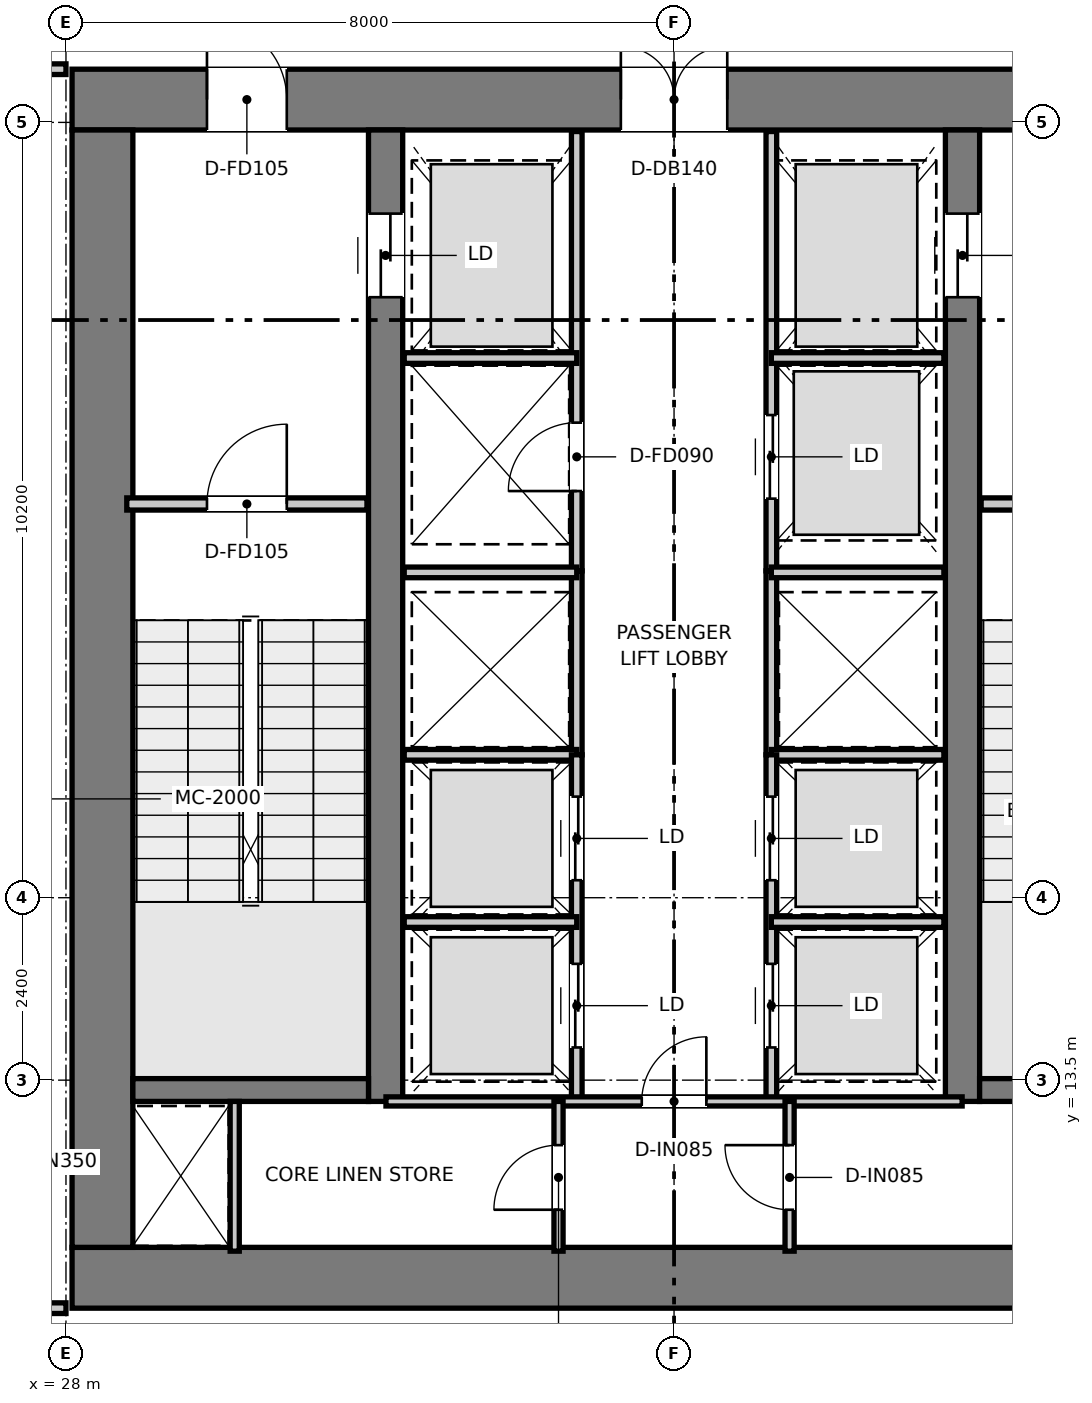
"""IFC4 building model, lengths in metres.
Left out: names, types, materials, properties, quantities, classifications, styles, units other than length and angle.
Written with IfcOpenShell. Run it as: python <this file> out.ifc"""

import sys

from ifc_helpers import new_model, si_unit, direction, frame, frame_2d, origin, place, context, subcontext, project, spatial, rectangle, extrude, element, fill, save


model = new_model("IFC4")
c1 = context("Model", 3, precision=1e-05, world=origin(), true_north=direction((0.0, 1.0)))
c2 = subcontext(c1, "Body", "Model", "MODEL_VIEW")
j1 = project(units=[si_unit("LENGTHUNIT", "METRE"), si_unit("PLANEANGLEUNIT", "RADIAN")], contexts=[c1])
p1 = place(None, origin())
s1 = spatial("IfcSite", under=j1, at=p1, CompositionType="ELEMENT")
p2 = place(p1, origin())
s2 = spatial("IfcBuilding", under=s1, at=p2, CompositionType="ELEMENT")
p3 = place(p2, frame((0.0, 0.0, 141.4)))
s3 = spatial("IfcBuildingStorey", under=s2, at=p3, CompositionType="ELEMENT", Elevation=141.4)
p4 = place(p3, frame((28.08, 10.9, 0.0), z_axis=(0.0, 0.0, 1.0), x_axis=(1.0, 0.0, 0.0)))
e1 = element("IfcWall", 1, at=p4, inside=s3, PredefinedType="SHEAR", context=c2, shape_type="SweptSolid", body=[
    extrude(rectangle(XDim=15.84, YDim=0.8, at=frame_2d((7.92, 0.0))), origin(), (0.0, 0.0, 1.0), 4.8),
])
p5 = place(p3, frame((28.08, 26.4, 0.0), z_axis=(0.0, 0.0, 1.0), x_axis=(1.0, 0.0, 0.0)))
e2 = element("IfcWall", 2, at=p5, inside=s3, PredefinedType="SHEAR", context=c2, shape_type="SweptSolid", body=[
    extrude(rectangle(XDim=15.84, YDim=0.8, at=frame_2d((7.92, 0.0))), origin(), (0.0, 0.0, 1.0), 4.8),
])
p6 = place(p5, frame((7.22, 0.0, 0.0)))
e3 = element("IfcOpeningElement", 3, at=p6, cuts=e2, PredefinedType="OPENING", context=c2, shape_type="SweptSolid", body=[
    extrude(rectangle(XDim=1.4, YDim=2.2, at=frame_2d((0.7, 1.1))), frame((0.0, 0.41, 0.0), z_axis=(0.0, -1.0, 0.0), x_axis=(1.0, 0.0, 0.0)), (0.0, 0.0, 1.0), 0.82),
])
p7 = place(p5, frame((1.775, 0.0, 0.0)))
e4 = element("IfcOpeningElement", 4, at=p7, cuts=e2, PredefinedType="OPENING", context=c2, shape_type="SweptSolid", body=[
    extrude(rectangle(XDim=1.05, YDim=2.1, at=frame_2d((0.525, 1.05))), frame((0.0, 0.41, 0.0), z_axis=(0.0, -1.0, 0.0), x_axis=(1.0, 0.0, 0.0)), (0.0, 0.0, 1.0), 0.82),
])
p8 = place(p5, frame((13.015, 0.0, 0.0)))
e5 = element("IfcOpeningElement", 5, at=p8, cuts=e2, PredefinedType="OPENING", context=c2, shape_type="SweptSolid", body=[
    extrude(rectangle(XDim=1.05, YDim=2.1, at=frame_2d((0.525, 1.05))), frame((0.0, 0.41, 0.0), z_axis=(0.0, -1.0, 0.0), x_axis=(1.0, 0.0, 0.0)), (0.0, 0.0, 1.0), 0.82),
])
p9 = place(p3, frame((28.48, 11.3, 0.0), z_axis=(0.0, 0.0, 1.0), x_axis=(0.0, 1.0, 0.0)))
e6 = element("IfcWall", 6, at=p9, inside=s3, PredefinedType="SHEAR", context=c2, shape_type="SweptSolid", body=[
    extrude(rectangle(XDim=14.7, YDim=0.8, at=frame_2d((7.35, 0.0))), origin(), (0.0, 0.0, 1.0), 4.8),
])
p10 = place(p3, frame((32.205, 13.22, 0.0), z_axis=(0.0, 0.0, 1.0), x_axis=(0.0, 1.0, 0.0)))
e7 = element("IfcWall", 7, at=p10, inside=s3, PredefinedType="SHEAR", context=c2, shape_type="SweptSolid", body=[
    extrude(rectangle(XDim=12.78, YDim=0.45, at=frame_2d((6.39, 0.0))), origin(), (0.0, 0.0, 1.0), 4.8),
])
p11 = place(p10, frame((10.58, 0.0, 0.0)))
e8 = element("IfcOpeningElement", 8, at=p11, cuts=e7, PredefinedType="OPENING", context=c2, shape_type="SweptSolid", body=[
    extrude(rectangle(XDim=1.1, YDim=2.15, at=frame_2d((0.55, 1.075))), frame((0.0, 0.235, 0.0), z_axis=(0.0, -1.0, 0.0), x_axis=(1.0, 0.0, 0.0)), (0.0, 0.0, 1.0), 0.47),
])
p12 = place(p3, frame((39.795, 13.22, 0.0), z_axis=(0.0, 0.0, 1.0), x_axis=(0.0, 1.0, 0.0)))
e9 = element("IfcWall", 9, at=p12, inside=s3, PredefinedType="SHEAR", context=c2, shape_type="SweptSolid", body=[
    extrude(rectangle(XDim=12.78, YDim=0.45, at=frame_2d((6.39, 0.0))), origin(), (0.0, 0.0, 1.0), 4.8),
])
p13 = place(p12, frame((10.58, 0.0, 0.0)))
e10 = element("IfcOpeningElement", 10, at=p13, cuts=e9, PredefinedType="OPENING", context=c2, shape_type="SweptSolid", body=[
    extrude(rectangle(XDim=1.1, YDim=2.15, at=frame_2d((0.55, 1.075))), frame((0.0, 0.235, 0.0), z_axis=(0.0, -1.0, 0.0), x_axis=(1.0, 0.0, 0.0)), (0.0, 0.0, 1.0), 0.47),
])
for number, where, z_axis, x_axis in (
    (11, (28.88, 13.37, 0.0), (0.0, 0.0, 1.0), (1.0, 0.0, 0.0)),
    (12, (40.02, 13.37, 0.0), (0.0, 0.0, 1.0), (1.0, 0.0, 0.0)),
):
    element("IfcWall", number, at=place(p3, frame(where, z_axis=z_axis, x_axis=x_axis)), inside=s3, PredefinedType="SHEAR", context=c2, shape_type="SweptSolid", body=[
        extrude(rectangle(XDim=3.1, YDim=0.3, at=frame_2d((1.55, 0.0))), origin(), (0.0, 0.0, 1.0), 4.8),
    ])
p14 = place(p3, frame((28.8, 21.08, 0.0), z_axis=(0.0, 0.0, 1.0), x_axis=(1.0, 0.0, 0.0)))
e13 = element("IfcWall", 13, at=p14, inside=s3, PredefinedType="PARTITIONING", context=c2, shape_type="SweptSolid", body=[
    extrude(rectangle(XDim=3.16, YDim=0.16, at=frame_2d((1.58, 0.0))), origin(), (0.0, 0.0, 1.0), 4.52),
])
p15 = place(p14, frame((1.055, 0.0, 0.0)))
e14 = element("IfcOpeningElement", 14, at=p15, cuts=e13, PredefinedType="OPENING", context=c2, shape_type="SweptSolid", body=[
    extrude(rectangle(XDim=1.05, YDim=2.1, at=frame_2d((0.525, 1.05))), frame((0.0, 0.09, 0.0), z_axis=(0.0, -1.0, 0.0), x_axis=(1.0, 0.0, 0.0)), (0.0, 0.0, 1.0), 0.18),
])
p16 = place(p3, frame((40.04, 21.08, 0.0), z_axis=(0.0, 0.0, 1.0), x_axis=(1.0, 0.0, 0.0)))
e15 = element("IfcWall", 15, at=p16, inside=s3, PredefinedType="PARTITIONING", context=c2, shape_type="SweptSolid", body=[
    extrude(rectangle(XDim=3.16, YDim=0.16, at=frame_2d((1.58, 0.0))), origin(), (0.0, 0.0, 1.0), 4.52),
])
p17 = place(p16, frame((1.055, 0.0, 0.0)))
e16 = element("IfcOpeningElement", 16, at=p17, cuts=e15, PredefinedType="OPENING", context=c2, shape_type="SweptSolid", body=[
    extrude(rectangle(XDim=1.05, YDim=2.1, at=frame_2d((0.525, 1.05))), frame((0.0, 0.09, 0.0), z_axis=(0.0, -1.0, 0.0), x_axis=(1.0, 0.0, 0.0)), (0.0, 0.0, 1.0), 0.18),
])
p18 = place(p3, frame((34.72, 20.2, 0.0), z_axis=(0.0, 0.0, 1.0), x_axis=(0.0, 1.0, 0.0)))
e17 = element("IfcWall", 17, at=p18, inside=s3, PredefinedType="PARTITIONING", context=c2, shape_type="SweptSolid", body=[
    extrude(rectangle(XDim=5.78, YDim=0.14, at=frame_2d((2.89, 0.0))), origin(), (0.0, 0.0, 1.0), 3.52),
])
p19 = place(p18, frame((1.05, 0.0, 0.0)))
e18 = element("IfcOpeningElement", 18, at=p19, cuts=e17, PredefinedType="OPENING", context=c2, shape_type="SweptSolid", body=[
    extrude(rectangle(XDim=0.9, YDim=2.1, at=frame_2d((0.45, 1.05))), frame((0.0, 0.08, 0.0), z_axis=(0.0, -1.0, 0.0), x_axis=(1.0, 0.0, 0.0)), (0.0, 0.0, 1.0), 0.16),
])
p20 = place(p3, frame((37.28, 20.2, 0.0), z_axis=(0.0, 0.0, 1.0), x_axis=(0.0, 1.0, 0.0)))
e19 = element("IfcWall", 19, at=p20, inside=s3, PredefinedType="PARTITIONING", context=c2, shape_type="SweptSolid", body=[
    extrude(rectangle(XDim=5.78, YDim=0.14, at=frame_2d((2.89, 0.0))), origin(), (0.0, 0.0, 1.0), 3.52),
])
p21 = place(p20, frame((0.95, 0.0, 0.0)))
e20 = element("IfcOpeningElement", 20, at=p21, cuts=e19, PredefinedType="OPENING", context=c2, shape_type="SweptSolid", body=[
    extrude(rectangle(XDim=1.1, YDim=2.15, at=frame_2d((0.55, 1.075))), frame((0.0, 0.08, 0.0), z_axis=(0.0, -1.0, 0.0), x_axis=(1.0, 0.0, 0.0)), (0.0, 0.0, 1.0), 0.16),
])
for number, where, z_axis, x_axis in (
    (21, (32.45, 23.0, 0.0), (0.0, 0.0, 1.0), (1.0, 0.0, 0.0)),
    (22, (37.28, 23.0, 0.0), (0.0, 0.0, 1.0), (1.0, 0.0, 0.0)),
):
    element("IfcWall", number, at=place(p3, frame(where, z_axis=z_axis, x_axis=x_axis)), inside=s3, PredefinedType="PARTITIONING", context=c2, shape_type="SweptSolid", body=[
        extrude(rectangle(XDim=2.27, YDim=0.14, at=frame_2d((1.135, 0.0))), origin(), (0.0, 0.0, 1.0), 3.52),
    ])
for number, where, z_axis, x_axis in (
    (23, (34.72, 17.78, 0.0), (0.0, 0.0, 1.0), (0.0, 1.0, 0.0)),
    (24, (37.28, 17.78, 0.0), (0.0, 0.0, 1.0), (0.0, 1.0, 0.0)),
):
    element("IfcWall", number, at=place(p3, frame(where, z_axis=z_axis, x_axis=x_axis)), inside=s3, PredefinedType="PARTITIONING", context=c2, shape_type="SweptSolid", body=[
        extrude(rectangle(XDim=2.42, YDim=0.14, at=frame_2d((1.21, 0.0))), origin(), (0.0, 0.0, 1.0), 4.52),
    ])
for number, where, z_axis, x_axis in (
    (25, (32.45, 17.78, 0.0), (0.0, 0.0, 1.0), (1.0, 0.0, 0.0)),
    (26, (32.45, 20.18, 0.0), (0.0, 0.0, 1.0), (1.0, 0.0, 0.0)),
    (27, (37.28, 17.78, 0.0), (0.0, 0.0, 1.0), (1.0, 0.0, 0.0)),
    (28, (37.28, 20.18, 0.0), (0.0, 0.0, 1.0), (1.0, 0.0, 0.0)),
):
    element("IfcWall", number, at=place(p3, frame(where, z_axis=z_axis, x_axis=x_axis)), inside=s3, PredefinedType="PARTITIONING", context=c2, shape_type="SweptSolid", body=[
        extrude(rectangle(XDim=2.27, YDim=0.14, at=frame_2d((1.135, 0.0))), origin(), (0.0, 0.0, 1.0), 4.52),
    ])
p22 = place(p3, frame((34.72, 13.22, 0.0), z_axis=(0.0, 0.0, 1.0), x_axis=(0.0, 1.0, 0.0)))
e29 = element("IfcWall", 29, at=p22, inside=s3, PredefinedType="PARTITIONING", context=c2, shape_type="SweptSolid", body=[
    extrude(rectangle(XDim=4.56, YDim=0.14, at=frame_2d((2.28, 0.0))), origin(), (0.0, 0.0, 1.0), 4.52),
])
p23 = place(p22, frame((0.71, 0.0, 0.0)))
e30 = element("IfcOpeningElement", 30, at=p23, cuts=e29, PredefinedType="OPENING", context=c2, shape_type="SweptSolid", body=[
    extrude(rectangle(XDim=1.1, YDim=2.15, at=frame_2d((0.55, 1.075))), frame((0.0, 0.08, 0.0), z_axis=(0.0, -1.0, 0.0), x_axis=(1.0, 0.0, 0.0)), (0.0, 0.0, 1.0), 0.16),
])
p24 = place(p22, frame((2.91, 0.0, 0.0)))
e31 = element("IfcOpeningElement", 31, at=p24, cuts=e29, PredefinedType="OPENING", context=c2, shape_type="SweptSolid", body=[
    extrude(rectangle(XDim=1.1, YDim=2.15, at=frame_2d((0.55, 1.075))), frame((0.0, 0.08, 0.0), z_axis=(0.0, -1.0, 0.0), x_axis=(1.0, 0.0, 0.0)), (0.0, 0.0, 1.0), 0.16),
])
p25 = place(p3, frame((32.45, 15.58, 0.0), z_axis=(0.0, 0.0, 1.0), x_axis=(1.0, 0.0, 0.0)))
e32 = element("IfcWall", 32, at=p25, inside=s3, PredefinedType="PARTITIONING", context=c2, shape_type="SweptSolid", body=[
    extrude(rectangle(XDim=2.27, YDim=0.14, at=frame_2d((1.135, 0.0))), origin(), (0.0, 0.0, 1.0), 4.52),
])
p26 = place(p3, frame((37.28, 13.22, 0.0), z_axis=(0.0, 0.0, 1.0), x_axis=(0.0, 1.0, 0.0)))
e33 = element("IfcWall", 33, at=p26, inside=s3, PredefinedType="PARTITIONING", context=c2, shape_type="SweptSolid", body=[
    extrude(rectangle(XDim=4.56, YDim=0.14, at=frame_2d((2.28, 0.0))), origin(), (0.0, 0.0, 1.0), 4.52),
])
p27 = place(p26, frame((0.71, 0.0, 0.0)))
e34 = element("IfcOpeningElement", 34, at=p27, cuts=e33, PredefinedType="OPENING", context=c2, shape_type="SweptSolid", body=[
    extrude(rectangle(XDim=1.1, YDim=2.15, at=frame_2d((0.55, 1.075))), frame((0.0, 0.08, 0.0), z_axis=(0.0, -1.0, 0.0), x_axis=(1.0, 0.0, 0.0)), (0.0, 0.0, 1.0), 0.16),
])
p28 = place(p26, frame((2.91, 0.0, 0.0)))
e35 = element("IfcOpeningElement", 35, at=p28, cuts=e33, PredefinedType="OPENING", context=c2, shape_type="SweptSolid", body=[
    extrude(rectangle(XDim=1.1, YDim=2.15, at=frame_2d((0.55, 1.075))), frame((0.0, 0.08, 0.0), z_axis=(0.0, -1.0, 0.0), x_axis=(1.0, 0.0, 0.0)), (0.0, 0.0, 1.0), 0.16),
])
p29 = place(p3, frame((37.28, 15.58, 0.0), z_axis=(0.0, 0.0, 1.0), x_axis=(1.0, 0.0, 0.0)))
e36 = element("IfcWall", 36, at=p29, inside=s3, PredefinedType="PARTITIONING", context=c2, shape_type="SweptSolid", body=[
    extrude(rectangle(XDim=2.27, YDim=0.14, at=frame_2d((1.135, 0.0))), origin(), (0.0, 0.0, 1.0), 4.52),
])
p30 = place(p3, frame((30.22, 11.25, 0.0), z_axis=(0.0, 0.0, 1.0), x_axis=(0.0, 1.0, 0.0)))
e37 = element("IfcWall", 37, at=p30, inside=s3, PredefinedType="PARTITIONING", context=c2, shape_type="SweptSolid", body=[
    extrude(rectangle(XDim=1.97, YDim=0.12, at=frame_2d((0.985, 0.0))), origin(), (0.0, 0.0, 1.0), 4.52),
])
p31 = place(p3, frame((32.21, 13.22, 0.0), z_axis=(0.0, 0.0, 1.0), x_axis=(1.0, 0.0, 0.0)))
e38 = element("IfcWall", 38, at=p31, inside=s3, PredefinedType="PARTITIONING", context=c2, shape_type="SweptSolid", body=[
    extrude(rectangle(XDim=7.58, YDim=0.12, at=frame_2d((3.79, 0.0))), origin(), (0.0, 0.0, 1.0), 4.52),
])
p32 = place(p31, frame((3.365, 0.0, 0.0)))
e39 = element("IfcOpeningElement", 39, at=p32, cuts=e38, PredefinedType="OPENING", context=c2, shape_type="SweptSolid", body=[
    extrude(rectangle(XDim=0.85, YDim=2.1, at=frame_2d((0.425, 1.05))), frame((0.0, 0.07, 0.0), z_axis=(0.0, -1.0, 0.0), x_axis=(1.0, 0.0, 0.0)), (0.0, 0.0, 1.0), 0.14),
])
p33 = place(p3, frame((34.48, 11.25, 0.0), z_axis=(0.0, 0.0, 1.0), x_axis=(0.0, 1.0, 0.0)))
e40 = element("IfcWall", 40, at=p33, inside=s3, PredefinedType="PARTITIONING", context=c2, shape_type="SweptSolid", body=[
    extrude(rectangle(XDim=1.97, YDim=0.12, at=frame_2d((0.985, 0.0))), origin(), (0.0, 0.0, 1.0), 4.52),
])
p34 = place(p33, frame((0.545, 0.0, 0.0)))
e41 = element("IfcOpeningElement", 41, at=p34, cuts=e40, PredefinedType="OPENING", context=c2, shape_type="SweptSolid", body=[
    extrude(rectangle(XDim=0.85, YDim=2.1, at=frame_2d((0.425, 1.05))), frame((0.0, 0.07, 0.0), z_axis=(0.0, -1.0, 0.0), x_axis=(1.0, 0.0, 0.0)), (0.0, 0.0, 1.0), 0.14),
])
p35 = place(p3, frame((37.52, 11.25, 0.0), z_axis=(0.0, 0.0, 1.0), x_axis=(0.0, 1.0, 0.0)))
e42 = element("IfcWall", 42, at=p35, inside=s3, PredefinedType="PARTITIONING", context=c2, shape_type="SweptSolid", body=[
    extrude(rectangle(XDim=1.97, YDim=0.12, at=frame_2d((0.985, 0.0))), origin(), (0.0, 0.0, 1.0), 4.52),
])
p36 = place(p35, frame((0.545, 0.0, 0.0)))
e43 = element("IfcOpeningElement", 43, at=p36, cuts=e42, PredefinedType="OPENING", context=c2, shape_type="SweptSolid", body=[
    extrude(rectangle(XDim=0.85, YDim=2.1, at=frame_2d((0.425, 1.05))), frame((0.0, 0.07, 0.0), z_axis=(0.0, -1.0, 0.0), x_axis=(1.0, 0.0, 0.0)), (0.0, 0.0, 1.0), 0.14),
])
p37 = place(p3, frame((26.32, 26.8, 0.0), z_axis=(0.0, 0.0, 1.0), x_axis=(1.0, 0.0, 0.0)))
e44 = element("IfcWall", 44, at=p37, inside=s3, PredefinedType="PARTITIONING", context=c2, shape_type="SweptSolid", body=[
    extrude(rectangle(XDim=1.68, YDim=0.14, at=frame_2d((0.84, 0.0))), origin(), (0.0, 0.0, 1.0), 3.93),
])
p38 = place(p37, frame((0.445, 0.0, 0.0)))
e45 = element("IfcOpeningElement", 45, at=p38, cuts=e44, PredefinedType="OPENING", context=c2, shape_type="SweptSolid", body=[
    extrude(rectangle(XDim=0.85, YDim=2.1, at=frame_2d((0.425, 1.05))), frame((0.0, 0.08, 0.0), z_axis=(0.0, -1.0, 0.0), x_axis=(1.0, 0.0, 0.0)), (0.0, 0.0, 1.0), 0.16),
])
p39 = place(p3, frame((26.32, 10.5, 0.0), z_axis=(0.0, 0.0, 1.0), x_axis=(1.0, 0.0, 0.0)))
e46 = element("IfcWall", 46, at=p39, inside=s3, PredefinedType="PARTITIONING", context=c2, shape_type="SweptSolid", body=[
    extrude(rectangle(XDim=1.68, YDim=0.14, at=frame_2d((0.84, 0.0))), origin(), (0.0, 0.0, 1.0), 4.52),
])
p40 = place(p15, origin())
e47 = element("IfcDoor", 47, at=p40, inside=s3, OperationType="SINGLE_SWING_RIGHT", PredefinedType="DOOR", context=c2, shape_type="SweptSolid", body=[
    extrude(rectangle(XDim=1.05, YDim=2.1, at=frame_2d((0.525, 1.05))), frame((0.0, 0.025, 0.0), z_axis=(0.0, -1.0, 0.0), x_axis=(1.0, 0.0, 0.0)), (0.0, 0.0, 1.0), 0.05),
])
fill(e14, e47)
p41 = place(p6, origin())
e48 = element("IfcDoor", 48, at=p41, inside=s3, OperationType="DOUBLE_DOOR_SINGLE_SWING", PredefinedType="DOOR", context=c2, shape_type="SweptSolid", body=[
    extrude(rectangle(XDim=1.4, YDim=2.2, at=frame_2d((0.7, 1.1))), frame((0.0, 0.025, 0.0), z_axis=(0.0, -1.0, 0.0), x_axis=(1.0, 0.0, 0.0)), (0.0, 0.0, 1.0), 0.05),
])
fill(e3, e48)
p42 = place(p7, origin())
e49 = element("IfcDoor", 49, at=p42, inside=s3, OperationType="SINGLE_SWING_LEFT", PredefinedType="DOOR", context=c2, shape_type="SweptSolid", body=[
    extrude(rectangle(XDim=1.05, YDim=2.1, at=frame_2d((0.525, 1.05))), frame((0.0, 0.025, 0.0), z_axis=(0.0, -1.0, 0.0), x_axis=(1.0, 0.0, 0.0)), (0.0, 0.0, 1.0), 0.05),
])
fill(e4, e49)
p43 = place(p11, origin())
e50 = element("IfcDoor", 50, at=p43, inside=s3, OperationType="DOUBLE_DOOR_SLIDING", PredefinedType="DOOR", context=c2, shape_type="SweptSolid", body=[
    extrude(rectangle(XDim=1.1, YDim=2.15, at=frame_2d((0.55, 1.075))), frame((0.0, 0.025, 0.0), z_axis=(0.0, -1.0, 0.0), x_axis=(1.0, 0.0, 0.0)), (0.0, 0.0, 1.0), 0.05),
])
fill(e8, e50)
p44 = place(p13, origin())
e51 = element("IfcDoor", 51, at=p44, inside=s3, OperationType="DOUBLE_DOOR_SLIDING", PredefinedType="DOOR", context=c2, shape_type="SweptSolid", body=[
    extrude(rectangle(XDim=1.1, YDim=2.15, at=frame_2d((0.55, 1.075))), frame((0.0, 0.025, 0.0), z_axis=(0.0, -1.0, 0.0), x_axis=(1.0, 0.0, 0.0)), (0.0, 0.0, 1.0), 0.05),
])
fill(e10, e51)
p45 = place(p19, origin())
e52 = element("IfcDoor", 52, at=p45, inside=s3, OperationType="SINGLE_SWING_LEFT", PredefinedType="DOOR", context=c2, shape_type="SweptSolid", body=[
    extrude(rectangle(XDim=0.9, YDim=2.1, at=frame_2d((0.45, 1.05))), frame((0.0, 0.025, 0.0), z_axis=(0.0, -1.0, 0.0), x_axis=(1.0, 0.0, 0.0)), (0.0, 0.0, 1.0), 0.05),
])
fill(e18, e52)
p46 = place(p21, origin())
e53 = element("IfcDoor", 53, at=p46, inside=s3, OperationType="DOUBLE_DOOR_SLIDING", PredefinedType="DOOR", context=c2, shape_type="SweptSolid", body=[
    extrude(rectangle(XDim=1.1, YDim=2.15, at=frame_2d((0.55, 1.075))), frame((0.0, 0.025, 0.0), z_axis=(0.0, -1.0, 0.0), x_axis=(1.0, 0.0, 0.0)), (0.0, 0.0, 1.0), 0.05),
])
fill(e20, e53)
p47 = place(p23, origin())
e54 = element("IfcDoor", 54, at=p47, inside=s3, OperationType="DOUBLE_DOOR_SLIDING", PredefinedType="DOOR", context=c2, shape_type="SweptSolid", body=[
    extrude(rectangle(XDim=1.1, YDim=2.15, at=frame_2d((0.55, 1.075))), frame((0.0, 0.025, 0.0), z_axis=(0.0, -1.0, 0.0), x_axis=(1.0, 0.0, 0.0)), (0.0, 0.0, 1.0), 0.05),
])
fill(e30, e54)
p48 = place(p24, origin())
e55 = element("IfcDoor", 55, at=p48, inside=s3, OperationType="DOUBLE_DOOR_SLIDING", PredefinedType="DOOR", context=c2, shape_type="SweptSolid", body=[
    extrude(rectangle(XDim=1.1, YDim=2.15, at=frame_2d((0.55, 1.075))), frame((0.0, 0.025, 0.0), z_axis=(0.0, -1.0, 0.0), x_axis=(1.0, 0.0, 0.0)), (0.0, 0.0, 1.0), 0.05),
])
fill(e31, e55)
p49 = place(p27, origin())
e56 = element("IfcDoor", 56, at=p49, inside=s3, OperationType="DOUBLE_DOOR_SLIDING", PredefinedType="DOOR", context=c2, shape_type="SweptSolid", body=[
    extrude(rectangle(XDim=1.1, YDim=2.15, at=frame_2d((0.55, 1.075))), frame((0.0, 0.025, 0.0), z_axis=(0.0, -1.0, 0.0), x_axis=(1.0, 0.0, 0.0)), (0.0, 0.0, 1.0), 0.05),
])
fill(e34, e56)
p50 = place(p28, origin())
e57 = element("IfcDoor", 57, at=p50, inside=s3, OperationType="DOUBLE_DOOR_SLIDING", PredefinedType="DOOR", context=c2, shape_type="SweptSolid", body=[
    extrude(rectangle(XDim=1.1, YDim=2.15, at=frame_2d((0.55, 1.075))), frame((0.0, 0.025, 0.0), z_axis=(0.0, -1.0, 0.0), x_axis=(1.0, 0.0, 0.0)), (0.0, 0.0, 1.0), 0.05),
])
fill(e35, e57)
p51 = place(p32, origin())
e58 = element("IfcDoor", 58, at=p51, inside=s3, OperationType="SINGLE_SWING_RIGHT", PredefinedType="DOOR", context=c2, shape_type="SweptSolid", body=[
    extrude(rectangle(XDim=0.85, YDim=2.1, at=frame_2d((0.425, 1.05))), frame((0.0, 0.025, 0.0), z_axis=(0.0, -1.0, 0.0), x_axis=(1.0, 0.0, 0.0)), (0.0, 0.0, 1.0), 0.05),
])
fill(e39, e58)
p52 = place(p34, origin())
e59 = element("IfcDoor", 59, at=p52, inside=s3, OperationType="SINGLE_SWING_LEFT", PredefinedType="DOOR", context=c2, shape_type="SweptSolid", body=[
    extrude(rectangle(XDim=0.85, YDim=2.1, at=frame_2d((0.425, 1.05))), frame((0.0, 0.025, 0.0), z_axis=(0.0, -1.0, 0.0), x_axis=(1.0, 0.0, 0.0)), (0.0, 0.0, 1.0), 0.05),
])
fill(e41, e59)
p53 = place(p36, origin())
e60 = element("IfcDoor", 60, at=p53, inside=s3, OperationType="SINGLE_SWING_RIGHT", PredefinedType="DOOR", context=c2, shape_type="SweptSolid", body=[
    extrude(rectangle(XDim=0.85, YDim=2.1, at=frame_2d((0.425, 1.05))), frame((0.0, 0.025, 0.0), z_axis=(0.0, -1.0, 0.0), x_axis=(1.0, 0.0, 0.0)), (0.0, 0.0, 1.0), 0.05),
])
fill(e43, e60)
save(model, sys.argv[1])
